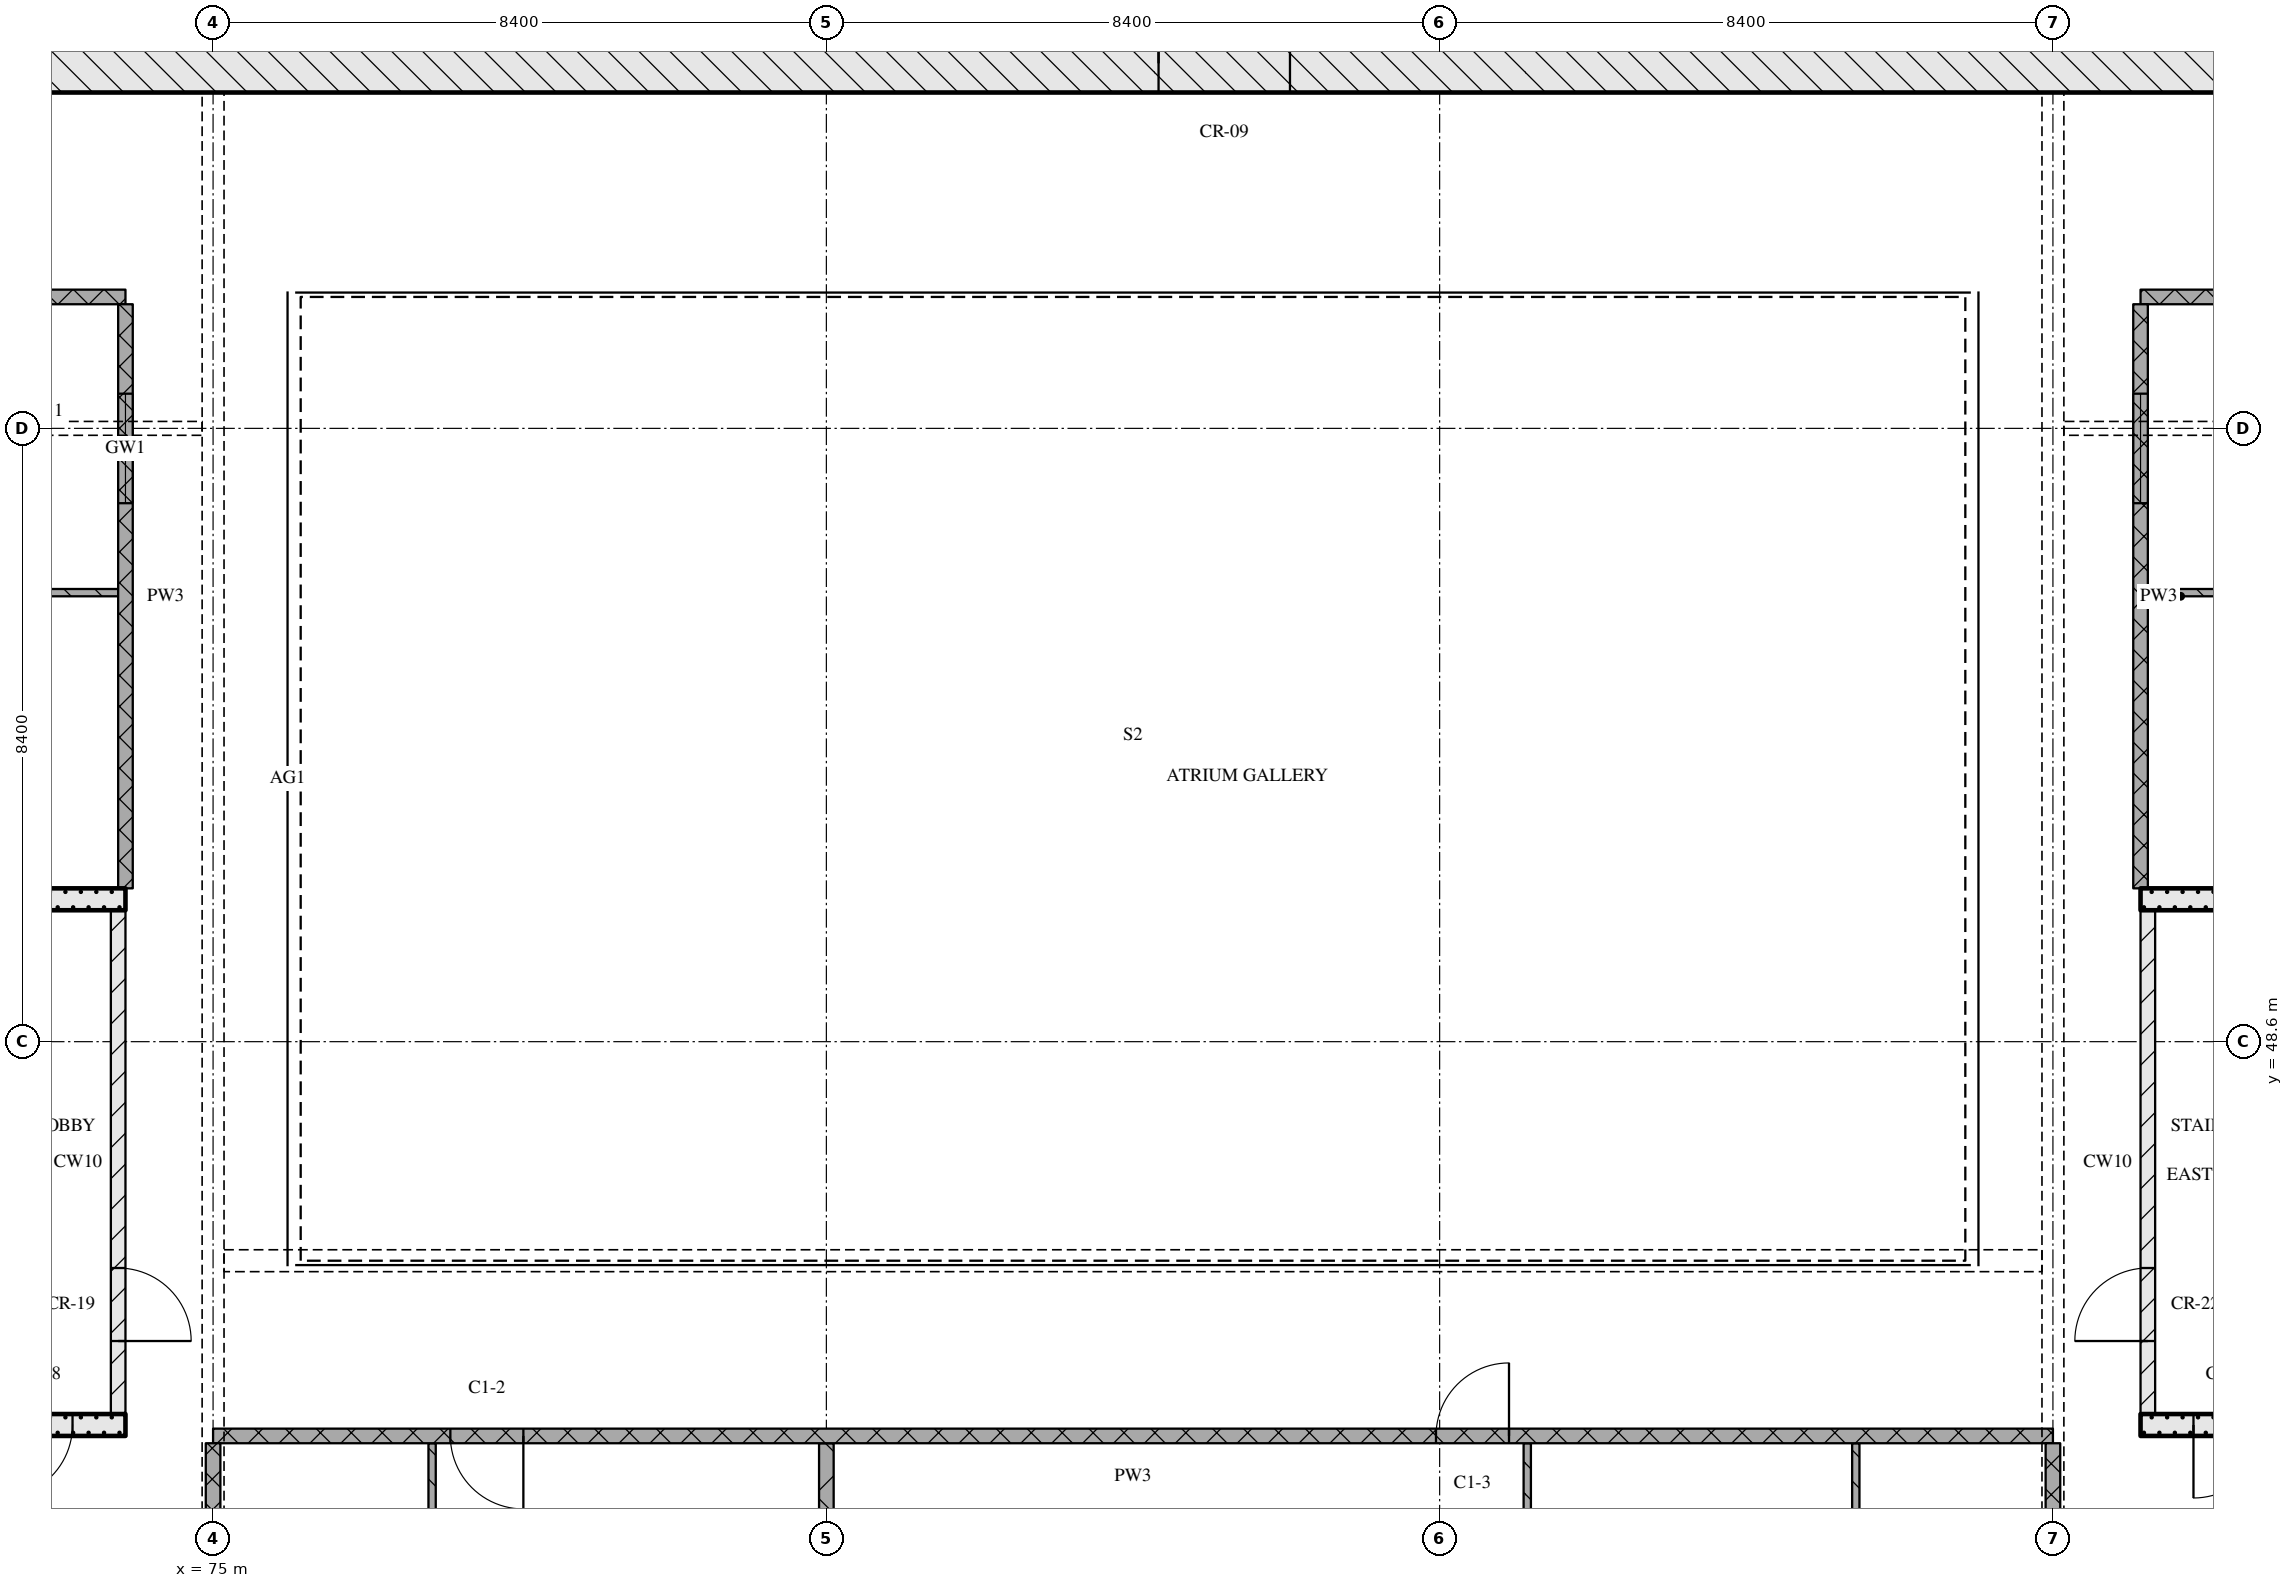
"""IFC4 building model, lengths in metres.
Left out: names, types, materials, properties, quantities, classifications, styles, units other than length and angle.
Written with IfcOpenShell. Run it as: python <this file> out.ifc"""

import sys

from ifc_helpers import new_model, si_unit, direction, frame, frame_2d, origin, place, context, subcontext, project, spatial, rectangle, extrude, element, fill, save


model = new_model("IFC4")
c1 = context("Model", 3, precision=1e-05, world=origin(), true_north=direction((0.0, 1.0)))
c2 = subcontext(c1, "Body", "Model", "MODEL_VIEW")
j1 = project(units=[si_unit("LENGTHUNIT", "METRE"), si_unit("PLANEANGLEUNIT", "RADIAN")], contexts=[c1])
p1 = place(None, origin())
s1 = spatial("IfcSite", under=j1, at=p1, CompositionType="ELEMENT")
p2 = place(p1, origin())
s2 = spatial("IfcBuilding", under=s1, at=p2, CompositionType="ELEMENT")
p3 = place(p2, frame((0.0, 0.0, 147.45)))
s3 = spatial("IfcBuildingStorey", under=s2, at=p3, CompositionType="ELEMENT", Elevation=147.45)
p4 = place(p3, frame((67.0, 62.0, 0.0), z_axis=(0.0, 0.0, 1.0), x_axis=(1.0, 0.0, 0.0)))
e1 = element("IfcWall", 1, at=p4, inside=s3, PredefinedType="SOLIDWALL", context=c2, shape_type="SweptSolid", body=[
    extrude(rectangle(XDim=41.2, YDim=0.8, at=frame_2d((20.6, 0.0))), origin(), (0.0, 0.0, 1.0), 3.32),
])
p5 = place(p4, frame((20.95, 0.0, 0.0)))
e2 = element("IfcOpeningElement", 2, at=p5, cuts=e1, PredefinedType="OPENING", context=c2, shape_type="SweptSolid", body=[
    extrude(rectangle(XDim=1.8, YDim=2.1, at=frame_2d((0.9, 1.05))), frame((0.0, 0.41, 0.0), z_axis=(0.0, -1.0, 0.0), x_axis=(1.0, 0.0, 0.0)), (0.0, 0.0, 1.0), 0.82),
])
p6 = place(p3, frame((68.2, 43.35, 0.0), z_axis=(0.0, 0.0, 1.0), x_axis=(1.0, 0.0, 0.0)))
e3 = element("IfcWall", 3, at=p6, inside=s3, PredefinedType="SOLIDWALL", context=c2, shape_type="SweptSolid", body=[
    extrude(rectangle(XDim=5.6, YDim=0.3, at=frame_2d((2.8, 0.0))), origin(), (0.0, 0.0, 1.0), 3.32),
])
p7 = place(p6, frame((3.875, 0.0, 0.0)))
e4 = element("IfcOpeningElement", 4, at=p7, cuts=e3, PredefinedType="OPENING", context=c2, shape_type="SweptSolid", body=[
    extrude(rectangle(XDim=1.0, YDim=2.1, at=frame_2d((0.5, 1.05))), frame((0.0, 0.16, 0.0), z_axis=(0.0, -1.0, 0.0), x_axis=(1.0, 0.0, 0.0)), (0.0, 0.0, 1.0), 0.32),
])
p8 = place(p3, frame((73.7, 43.5, 0.0), z_axis=(0.0, 0.0, 1.0), x_axis=(0.0, 1.0, 0.0)))
e5 = element("IfcWall", 5, at=p8, inside=s3, PredefinedType="PARTITIONING", context=c2, shape_type="SweptSolid", body=[
    extrude(rectangle(XDim=6.9, YDim=0.2, at=frame_2d((3.45, 0.0))), origin(), (0.0, 0.0, 1.0), 3.32),
])
p9 = place(p8, frame((1.0, 0.0, 0.0)))
e6 = element("IfcOpeningElement", 6, at=p9, cuts=e5, PredefinedType="OPENING", context=c2, shape_type="SweptSolid", body=[
    extrude(rectangle(XDim=1.0, YDim=2.1, at=frame_2d((0.5, 1.05))), frame((0.0, 0.11, 0.0), z_axis=(0.0, -1.0, 0.0), x_axis=(1.0, 0.0, 0.0)), (0.0, 0.0, 1.0), 0.22),
])
p10 = place(p3, frame((68.2, 50.55, 0.0), z_axis=(0.0, 0.0, 1.0), x_axis=(1.0, 0.0, 0.0)))
e7 = element("IfcWall", 7, at=p10, inside=s3, PredefinedType="SOLIDWALL", context=c2, shape_type="SweptSolid", body=[
    extrude(rectangle(XDim=5.6, YDim=0.3, at=frame_2d((2.8, 0.0))), origin(), (0.0, 0.0, 1.0), 3.32),
])
p11 = place(p3, frame((101.4, 43.35, 0.0), z_axis=(0.0, 0.0, 1.0), x_axis=(1.0, 0.0, 0.0)))
e8 = element("IfcWall", 8, at=p11, inside=s3, PredefinedType="SOLIDWALL", context=c2, shape_type="SweptSolid", body=[
    extrude(rectangle(XDim=5.6, YDim=0.3, at=frame_2d((2.8, 0.0))), origin(), (0.0, 0.0, 1.0), 3.32),
])
p12 = place(p11, frame((0.725, 0.0, 0.0)))
e9 = element("IfcOpeningElement", 9, at=p12, cuts=e8, PredefinedType="OPENING", context=c2, shape_type="SweptSolid", body=[
    extrude(rectangle(XDim=1.0, YDim=2.1, at=frame_2d((0.5, 1.05))), frame((0.0, 0.16, 0.0), z_axis=(0.0, -1.0, 0.0), x_axis=(1.0, 0.0, 0.0)), (0.0, 0.0, 1.0), 0.32),
])
p13 = place(p3, frame((101.5, 43.5, 0.0), z_axis=(0.0, 0.0, 1.0), x_axis=(0.0, 1.0, 0.0)))
e10 = element("IfcWall", 10, at=p13, inside=s3, PredefinedType="PARTITIONING", context=c2, shape_type="SweptSolid", body=[
    extrude(rectangle(XDim=6.9, YDim=0.2, at=frame_2d((3.45, 0.0))), origin(), (0.0, 0.0, 1.0), 3.32),
])
p14 = place(p13, frame((1.0, 0.0, 0.0)))
e11 = element("IfcOpeningElement", 11, at=p14, cuts=e10, PredefinedType="OPENING", context=c2, shape_type="SweptSolid", body=[
    extrude(rectangle(XDim=1.0, YDim=2.1, at=frame_2d((0.5, 1.05))), frame((0.0, 0.11, 0.0), z_axis=(0.0, -1.0, 0.0), x_axis=(1.0, 0.0, 0.0)), (0.0, 0.0, 1.0), 0.22),
])
p15 = place(p3, frame((101.4, 50.55, 0.0), z_axis=(0.0, 0.0, 1.0), x_axis=(1.0, 0.0, 0.0)))
e12 = element("IfcWall", 12, at=p15, inside=s3, PredefinedType="SOLIDWALL", context=c2, shape_type="SweptSolid", body=[
    extrude(rectangle(XDim=5.6, YDim=0.3, at=frame_2d((2.8, 0.0))), origin(), (0.0, 0.0, 1.0), 3.32),
])
p16 = place(p3, frame((100.2, 43.2, 0.0), z_axis=(0.0, 0.0, 1.0), x_axis=(-1.0, 0.0, 0.0)))
e13 = element("IfcWall", 13, at=p16, inside=s3, PredefinedType="PARTITIONING", context=c2, shape_type="SweptSolid", body=[
    extrude(rectangle(XDim=25.2, YDim=0.2, at=frame_2d((12.6, 0.0))), origin(), (0.0, 0.0, 1.0), 3.32),
])
p17 = place(p16, frame((7.45, 0.0, 0.0)))
e14 = element("IfcOpeningElement", 14, at=p17, cuts=e13, PredefinedType="OPENING", context=c2, shape_type="SweptSolid", body=[
    extrude(rectangle(XDim=1.0, YDim=2.1, at=frame_2d((0.5, 1.05))), frame((0.0, 0.11, 0.0), z_axis=(0.0, -1.0, 0.0), x_axis=(1.0, 0.0, 0.0)), (0.0, 0.0, 1.0), 0.22),
])
p18 = place(p16, frame((20.95, 0.0, 0.0)))
e15 = element("IfcOpeningElement", 15, at=p18, cuts=e13, PredefinedType="OPENING", context=c2, shape_type="SweptSolid", body=[
    extrude(rectangle(XDim=1.0, YDim=2.1, at=frame_2d((0.5, 1.05))), frame((0.0, 0.11, 0.0), z_axis=(0.0, -1.0, 0.0), x_axis=(1.0, 0.0, 0.0)), (0.0, 0.0, 1.0), 0.22),
])
p19 = place(p3, frame((69.3, 54.75, 0.0), z_axis=(0.0, 0.0, 1.0), x_axis=(1.0, 0.0, 0.0)))
e16 = element("IfcWall", 16, at=p19, inside=s3, PredefinedType="PARTITIONING", context=c2, shape_type="SweptSolid", body=[
    extrude(rectangle(XDim=4.4, YDim=0.1, at=frame_2d((2.2, 0.0))), origin(), (0.0, 0.0, 1.0), 3.32),
])
p20 = place(p3, frame((101.5, 54.75, 0.0), z_axis=(0.0, 0.0, 1.0), x_axis=(1.0, 0.0, 0.0)))
e17 = element("IfcWall", 17, at=p20, inside=s3, PredefinedType="PARTITIONING", context=c2, shape_type="SweptSolid", body=[
    extrude(rectangle(XDim=4.4, YDim=0.1, at=frame_2d((2.2, 0.0))), origin(), (0.0, 0.0, 1.0), 3.32),
])
p21 = place(p20, frame((1.7, 0.0, 0.0)))
e18 = element("IfcOpeningElement", 18, at=p21, cuts=e17, PredefinedType="OPENING", context=c2, shape_type="SweptSolid", body=[
    extrude(rectangle(XDim=0.9, YDim=2.1, at=frame_2d((0.45, 1.05))), frame((0.0, 0.06, 0.0), z_axis=(0.0, -1.0, 0.0), x_axis=(1.0, 0.0, 0.0)), (0.0, 0.0, 1.0), 0.12),
])
for number, where, z_axis, x_axis in (
    (19, (63.0, 58.8, 0.0), (0.0, 0.0, 1.0), (1.0, 0.0, 0.0)),
    (20, (101.4, 58.8, 0.0), (0.0, 0.0, 1.0), (1.0, 0.0, 0.0)),
):
    element("IfcWall", number, at=place(p3, frame(where, z_axis=z_axis, x_axis=x_axis)), inside=s3, PredefinedType="PARTITIONING", context=c2, shape_type="SweptSolid", body=[
        extrude(rectangle(XDim=10.8, YDim=0.2, at=frame_2d((5.4, 0.0))), origin(), (0.0, 0.0, 1.0), 3.32),
    ])
p22 = place(p3, frame((73.8, 58.7, 0.0), z_axis=(0.0, 0.0, 1.0), x_axis=(0.0, -1.0, 0.0)))
e21 = element("IfcWall", 21, at=p22, inside=s3, PredefinedType="PARTITIONING", context=c2, shape_type="SweptSolid", body=[
    extrude(rectangle(XDim=8.0, YDim=0.2, at=frame_2d((4.0, 0.0))), origin(), (0.0, 0.0, 1.0), 3.32),
])
p23 = place(p22, frame((1.225, 0.0, 0.9)))
e22 = element("IfcOpeningElement", 22, at=p23, cuts=e21, PredefinedType="OPENING", context=c2, shape_type="SweptSolid", body=[
    extrude(rectangle(XDim=1.5, YDim=1.5, at=frame_2d((0.75, 0.75))), frame((0.0, 0.11, 0.0), z_axis=(0.0, -1.0, 0.0), x_axis=(1.0, 0.0, 0.0)), (0.0, 0.0, 1.0), 0.22),
])
p24 = place(p3, frame((75.0, 43.1, 0.0), z_axis=(0.0, 0.0, 1.0), x_axis=(0.0, -1.0, 0.0)))
e23 = element("IfcWall", 23, at=p24, inside=s3, PredefinedType="PARTITIONING", context=c2, shape_type="SweptSolid", body=[
    extrude(rectangle(XDim=2.2, YDim=0.2, at=frame_2d((1.1, 0.0))), origin(), (0.0, 0.0, 1.0), 2.43),
])
p25 = place(p3, frame((78.0, 43.1, 0.0), z_axis=(0.0, 0.0, 1.0), x_axis=(0.0, -1.0, 0.0)))
e24 = element("IfcWall", 24, at=p25, inside=s3, PredefinedType="PARTITIONING", context=c2, shape_type="SweptSolid", body=[
    extrude(rectangle(XDim=4.65, YDim=0.1, at=frame_2d((2.325, 0.0))), origin(), (0.0, 0.0, 1.0), 3.32),
])
p26 = place(p3, frame((83.4, 43.1, 0.0), z_axis=(0.0, 0.0, 1.0), x_axis=(0.0, -1.0, 0.0)))
e25 = element("IfcWall", 25, at=p26, inside=s3, PredefinedType="PARTITIONING", context=c2, shape_type="SweptSolid", body=[
    extrude(rectangle(XDim=2.53, YDim=0.2, at=frame_2d((1.265, 0.0))), origin(), (0.0, 0.0, 1.0), 3.32),
])
p27 = place(p3, frame((93.0, 43.1, 0.0), z_axis=(0.0, 0.0, 1.0), x_axis=(0.0, -1.0, 0.0)))
e26 = element("IfcWall", 26, at=p27, inside=s3, PredefinedType="PARTITIONING", context=c2, shape_type="SweptSolid", body=[
    extrude(rectangle(XDim=4.35, YDim=0.1, at=frame_2d((2.175, 0.0))), origin(), (0.0, 0.0, 1.0), 3.32),
])
p28 = place(p27, frame((1.6, 0.0, 0.0)))
e27 = element("IfcOpeningElement", 27, at=p28, cuts=e26, PredefinedType="OPENING", context=c2, shape_type="SweptSolid", body=[
    extrude(rectangle(XDim=0.8, YDim=2.1, at=frame_2d((0.4, 1.05))), frame((0.0, 0.06, 0.0), z_axis=(0.0, -1.0, 0.0), x_axis=(1.0, 0.0, 0.0)), (0.0, 0.0, 1.0), 0.12),
])
p29 = place(p3, frame((97.5, 43.1, 0.0), z_axis=(0.0, 0.0, 1.0), x_axis=(0.0, -1.0, 0.0)))
e28 = element("IfcWall", 28, at=p29, inside=s3, PredefinedType="PARTITIONING", context=c2, shape_type="SweptSolid", body=[
    extrude(rectangle(XDim=4.35, YDim=0.1, at=frame_2d((2.175, 0.0))), origin(), (0.0, 0.0, 1.0), 3.32),
])
p30 = place(p3, frame((100.2, 43.1, 0.0), z_axis=(0.0, 0.0, 1.0), x_axis=(0.0, -1.0, 0.0)))
e29 = element("IfcWall", 29, at=p30, inside=s3, PredefinedType="PARTITIONING", context=c2, shape_type="SweptSolid", body=[
    extrude(rectangle(XDim=2.2, YDim=0.2, at=frame_2d((1.1, 0.0))), origin(), (0.0, 0.0, 1.0), 2.43),
])
p31 = place(p3, frame((101.4, 58.7, 0.0), z_axis=(0.0, 0.0, 1.0), x_axis=(0.0, -1.0, 0.0)))
e30 = element("IfcWall", 30, at=p31, inside=s3, PredefinedType="PARTITIONING", context=c2, shape_type="SweptSolid", body=[
    extrude(rectangle(XDim=8.0, YDim=0.2, at=frame_2d((4.0, 0.0))), origin(), (0.0, 0.0, 1.0), 3.32),
])
p32 = place(p31, frame((1.225, 0.0, 0.9)))
e31 = element("IfcOpeningElement", 31, at=p32, cuts=e30, PredefinedType="OPENING", context=c2, shape_type="SweptSolid", body=[
    extrude(rectangle(XDim=1.5, YDim=1.5, at=frame_2d((0.75, 0.75))), frame((0.0, 0.11, 0.0), z_axis=(0.0, -1.0, 0.0), x_axis=(1.0, 0.0, 0.0)), (0.0, 0.0, 1.0), 0.22),
])
p33 = place(p5, origin())
e32 = element("IfcDoor", 32, at=p33, inside=s3, OperationType="DOUBLE_DOOR_SINGLE_SWING", PredefinedType="DOOR", context=c2, shape_type="SweptSolid", body=[
    extrude(rectangle(XDim=1.8, YDim=2.1, at=frame_2d((0.9, 1.05))), frame((0.0, 0.025, 0.0), z_axis=(0.0, -1.0, 0.0), x_axis=(1.0, 0.0, 0.0)), (0.0, 0.0, 1.0), 0.05),
])
fill(e2, e32)
p34 = place(p7, origin())
e33 = element("IfcDoor", 33, at=p34, inside=s3, OperationType="SINGLE_SWING_RIGHT", PredefinedType="DOOR", context=c2, shape_type="SweptSolid", body=[
    extrude(rectangle(XDim=1.0, YDim=2.1, at=frame_2d((0.5, 1.05))), frame((0.0, 0.025, 0.0), z_axis=(0.0, -1.0, 0.0), x_axis=(1.0, 0.0, 0.0)), (0.0, 0.0, 1.0), 0.05),
])
fill(e4, e33)
p35 = place(p9, origin())
e34 = element("IfcDoor", 34, at=p35, inside=s3, OperationType="SINGLE_SWING_RIGHT", PredefinedType="DOOR", context=c2, shape_type="SweptSolid", body=[
    extrude(rectangle(XDim=1.0, YDim=2.1, at=frame_2d((0.5, 1.05))), frame((0.0, 0.025, 0.0), z_axis=(0.0, -1.0, 0.0), x_axis=(1.0, 0.0, 0.0)), (0.0, 0.0, 1.0), 0.05),
])
fill(e6, e34)
p36 = place(p12, origin())
e35 = element("IfcDoor", 35, at=p36, inside=s3, OperationType="SINGLE_SWING_RIGHT", PredefinedType="DOOR", context=c2, shape_type="SweptSolid", body=[
    extrude(rectangle(XDim=1.0, YDim=2.1, at=frame_2d((0.5, 1.05))), frame((0.0, 0.025, 0.0), z_axis=(0.0, -1.0, 0.0), x_axis=(1.0, 0.0, 0.0)), (0.0, 0.0, 1.0), 0.05),
])
fill(e9, e35)
p37 = place(p14, origin())
e36 = element("IfcDoor", 36, at=p37, inside=s3, OperationType="SINGLE_SWING_LEFT", PredefinedType="DOOR", context=c2, shape_type="SweptSolid", body=[
    extrude(rectangle(XDim=1.0, YDim=2.1, at=frame_2d((0.5, 1.05))), frame((0.0, 0.025, 0.0), z_axis=(0.0, -1.0, 0.0), x_axis=(1.0, 0.0, 0.0)), (0.0, 0.0, 1.0), 0.05),
])
fill(e11, e36)
p38 = place(p17, origin())
e37 = element("IfcDoor", 37, at=p38, inside=s3, OperationType="SINGLE_SWING_RIGHT", PredefinedType="DOOR", context=c2, shape_type="SweptSolid", body=[
    extrude(rectangle(XDim=1.0, YDim=2.1, at=frame_2d((0.5, 1.05))), frame((0.0, 0.025, 0.0), z_axis=(0.0, -1.0, 0.0), x_axis=(1.0, 0.0, 0.0)), (0.0, 0.0, 1.0), 0.05),
])
fill(e14, e37)
p39 = place(p18, origin())
e38 = element("IfcDoor", 38, at=p39, inside=s3, OperationType="SINGLE_SWING_LEFT", PredefinedType="DOOR", context=c2, shape_type="SweptSolid", body=[
    extrude(rectangle(XDim=1.0, YDim=2.1, at=frame_2d((0.5, 1.05))), frame((0.0, 0.025, 0.0), z_axis=(0.0, -1.0, 0.0), x_axis=(1.0, 0.0, 0.0)), (0.0, 0.0, 1.0), 0.05),
])
fill(e15, e38)
p40 = place(p23, origin())
e39 = element("IfcWindow", 39, at=p40, inside=s3, PartitioningType="SINGLE_PANEL", PredefinedType="WINDOW", context=c2, shape_type="SweptSolid", body=[
    extrude(rectangle(XDim=1.5, YDim=1.5, at=frame_2d((0.75, 0.75))), frame((0.0, 0.03, 0.0), z_axis=(0.0, -1.0, 0.0), x_axis=(1.0, 0.0, 0.0)), (0.0, 0.0, 1.0), 0.06),
])
fill(e22, e39)
p41 = place(p32, origin())
e40 = element("IfcWindow", 40, at=p41, inside=s3, PartitioningType="SINGLE_PANEL", PredefinedType="WINDOW", context=c2, shape_type="SweptSolid", body=[
    extrude(rectangle(XDim=1.5, YDim=1.5, at=frame_2d((0.75, 0.75))), frame((0.0, 0.03, 0.0), z_axis=(0.0, -1.0, 0.0), x_axis=(1.0, 0.0, 0.0)), (0.0, 0.0, 1.0), 0.06),
])
fill(e31, e40)
save(model, sys.argv[1])
